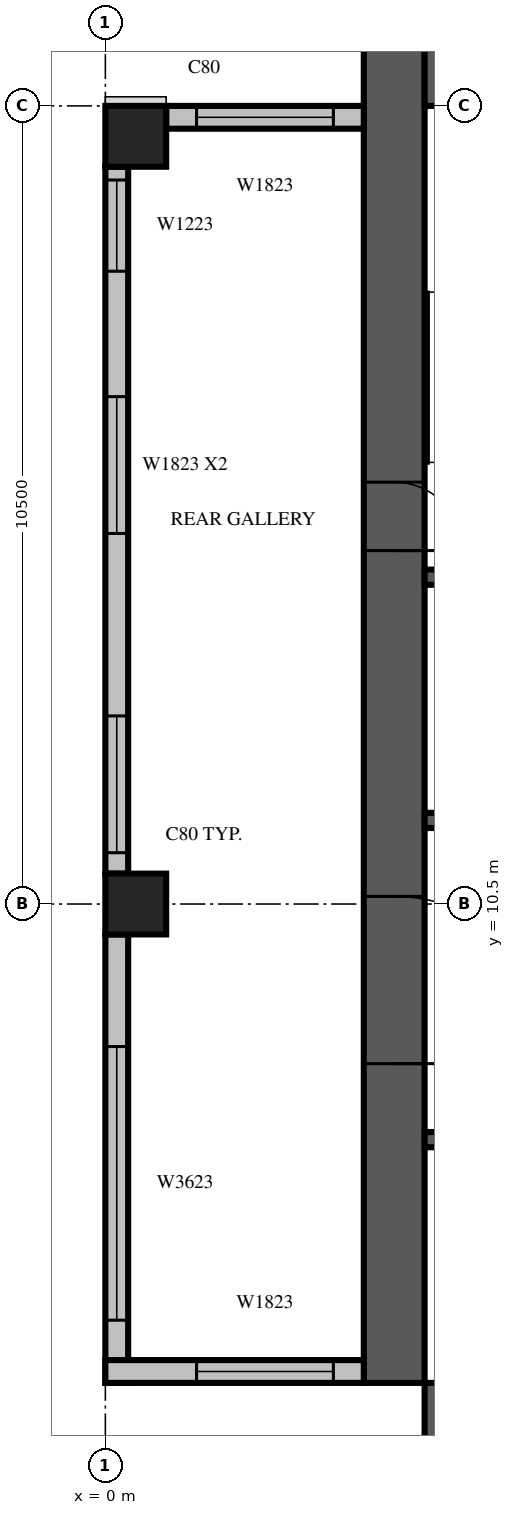
"""IFC4 building model, lengths in metres.
Left out: names, types, materials, properties, quantities, classifications, styles, units other than length and angle.
Written with IfcOpenShell. Run it as: python <this file> out.ifc"""

import sys

from ifc_helpers import new_model, si_unit, direction, frame, frame_2d, origin, origin_2d, place, context, subcontext, project, spatial, rectangle, extrude, source, transform, mapped, element, fill, save


model = new_model("IFC4")
c1 = context("Model", 3, precision=1e-05, world=origin(), true_north=direction((0.0, 1.0)))
c2 = subcontext(c1, "Body", "Model", "MODEL_VIEW")
j1 = project(units=[si_unit("LENGTHUNIT", "METRE"), si_unit("PLANEANGLEUNIT", "RADIAN")], contexts=[c1])
p1 = place(None, origin())
s1 = spatial("IfcSite", under=j1, at=p1, CompositionType="ELEMENT")
p2 = place(p1, origin())
s2 = spatial("IfcBuilding", under=s1, at=p2, CompositionType="ELEMENT")
p3 = place(p2, frame((0.0, 0.0, 250.0)))
s3 = spatial("IfcBuildingStorey", under=s2, at=p3, CompositionType="ELEMENT", Elevation=250.0)
m1 = source(origin(), c2, "Body", "SweptSolid", [
    extrude(rectangle(XDim=0.8, YDim=0.8, at=origin_2d()), origin(), (0.0, 0.0, 1.0), 3.8),
])
for number, where, z_axis, x_axis in (
    (1, (0.4, 10.5, 0.0), (0.0, 0.0, 1.0), (1.0, 0.0, 0.0)),
    (2, (0.4, 20.6, 0.0), (0.0, 0.0, 1.0), (1.0, 0.0, 0.0)),
):
    element("IfcColumn", number, at=place(p3, frame(where, z_axis=z_axis, x_axis=x_axis)), inside=s3, PredefinedType="COLUMN", context=c2, shape_type="MappedRepresentation", body=[
        mapped(m1, transform((0.0, 0.0, 0.0), scale=1.0)),
    ])
m2 = source(origin(), c2, "Body", "SweptSolid", [
    extrude(rectangle(XDim=17.6, YDim=0.8, at=frame_2d((8.8, 0.0))), origin(), (0.0, 0.0, 1.0), 3.8),
])
p4 = place(p3, frame((3.8, 4.2, 0.0), z_axis=(0.0, 0.0, 1.0), x_axis=(0.0, 1.0, 0.0)))
e3 = element("IfcWall", 3, at=p4, inside=s3, PredefinedType="SHEAR", context=c2, shape_type="MappedRepresentation", body=[
    mapped(m2, transform((0.0, 0.0, 0.0), scale=1.0)),
])
m3 = source(origin(), c2, "Body", "SweptSolid", [
    extrude(rectangle(XDim=2.2, YDim=2.1, at=frame_2d((1.1, 1.05))), frame((0.0, 0.41, 0.0), z_axis=(0.0, -1.0, 0.0), x_axis=(1.0, 0.0, 0.0)), (0.0, 0.0, 1.0), 0.82),
])
p5 = place(p4, frame((4.2, 0.0, 0.0)))
e4 = element("IfcOpeningElement", 4, at=p5, cuts=e3, PredefinedType="OPENING", context=c2, shape_type="MappedRepresentation", body=[
    mapped(m3, transform((0.0, 0.0, 0.0), scale=1.0)),
])
m4 = source(origin(), c2, "Body", "SweptSolid", [
    extrude(rectangle(XDim=0.9, YDim=2.1, at=frame_2d((0.45, 1.05))), frame((0.0, 0.41, 0.0), z_axis=(0.0, -1.0, 0.0), x_axis=(1.0, 0.0, 0.0)), (0.0, 0.0, 1.0), 0.82),
])
p6 = place(p4, frame((10.95, 0.0, 0.0)))
e5 = element("IfcOpeningElement", 5, at=p6, cuts=e3, PredefinedType="OPENING", context=c2, shape_type="MappedRepresentation", body=[
    mapped(m4, transform((0.0, 0.0, 0.0), scale=1.0)),
])
p7 = place(p3, frame((4.2, 3.8, 0.0), z_axis=(0.0, 0.0, 1.0), x_axis=(1.0, 0.0, 0.0)))
e6 = element("IfcWall", 6, at=p7, inside=s3, PredefinedType="SHEAR", context=c2, shape_type="MappedRepresentation", body=[
    mapped(m2, transform((0.0, 0.0, 0.0), scale=1.0)),
])
p8 = place(p7, frame((11.55, 0.0, 0.0)))
e7 = element("IfcOpeningElement", 7, at=p8, cuts=e6, PredefinedType="OPENING", context=c2, shape_type="MappedRepresentation", body=[
    mapped(m4, transform((0.0, 0.0, 0.0), scale=1.0)),
])
m5 = source(origin(), c2, "Body", "SweptSolid", [
    extrude(rectangle(XDim=16.8, YDim=0.8, at=frame_2d((8.4, 0.0))), origin(), (0.0, 0.0, 1.0), 3.8),
])
p9 = place(p3, frame((4.2, 21.4, 0.0), z_axis=(0.0, 0.0, 1.0), x_axis=(1.0, 0.0, 0.0)))
e8 = element("IfcWall", 8, at=p9, inside=s3, PredefinedType="SHEAR", context=c2, shape_type="MappedRepresentation", body=[
    mapped(m5, transform((0.0, 0.0, 0.0), scale=1.0)),
])
m6 = source(origin(), c2, "Body", "SweptSolid", [
    extrude(rectangle(XDim=1.2, YDim=2.1, at=frame_2d((0.6, 1.05))), frame((0.0, 0.41, 0.0), z_axis=(0.0, -1.0, 0.0), x_axis=(1.0, 0.0, 0.0)), (0.0, 0.0, 1.0), 0.82),
])
p10 = place(p9, frame((6.2, 0.0, 0.0)))
e9 = element("IfcOpeningElement", 9, at=p10, cuts=e8, PredefinedType="OPENING", context=c2, shape_type="MappedRepresentation", body=[
    mapped(m6, transform((0.0, 0.0, 0.0), scale=1.0)),
])
m7 = source(origin(), c2, "Body", "SweptSolid", [
    extrude(rectangle(XDim=2.6, YDim=0.3, at=frame_2d((1.3, 0.0))), origin(), (0.0, 0.0, 1.0), 3.4),
])
p11 = place(p3, frame((3.4, 20.85, 0.0), z_axis=(0.0, 0.0, 1.0), x_axis=(-1.0, 0.0, 0.0)))
e10 = element("IfcWall", 10, at=p11, inside=s3, PredefinedType="STANDARD", context=c2, shape_type="MappedRepresentation", body=[
    mapped(m7, transform((0.0, 0.0, 0.0), scale=1.0)),
])
m8 = source(origin(), c2, "Body", "SweptSolid", [
    extrude(rectangle(XDim=1.8, YDim=2.3, at=frame_2d((0.9, 1.15))), frame((0.0, 0.16, 0.0), z_axis=(0.0, -1.0, 0.0), x_axis=(1.0, 0.0, 0.0)), (0.0, 0.0, 1.0), 0.32),
])
p12 = place(p11, frame((0.4, 0.0, 0.6)))
e11 = element("IfcOpeningElement", 11, at=p12, cuts=e10, PredefinedType="OPENING", context=c2, shape_type="MappedRepresentation", body=[
    mapped(m8, transform((0.0, 0.0, 0.0), scale=1.0)),
])
m9 = source(origin(), c2, "Body", "SweptSolid", [
    extrude(rectangle(XDim=9.3, YDim=0.3, at=frame_2d((4.65, 0.0))), origin(), (0.0, 0.0, 1.0), 3.4),
])
p13 = place(p3, frame((0.15, 20.2, 0.0), z_axis=(0.0, 0.0, 1.0), x_axis=(0.0, -1.0, 0.0)))
e12 = element("IfcWall", 12, at=p13, inside=s3, PredefinedType="STANDARD", context=c2, shape_type="MappedRepresentation", body=[
    mapped(m9, transform((0.0, 0.0, 0.0), scale=1.0)),
])
m10 = source(origin(), c2, "Body", "SweptSolid", [
    extrude(rectangle(XDim=1.2, YDim=2.3, at=frame_2d((0.6, 1.15))), frame((0.0, 0.16, 0.0), z_axis=(0.0, -1.0, 0.0), x_axis=(1.0, 0.0, 0.0)), (0.0, 0.0, 1.0), 0.32),
])
p14 = place(p13, frame((0.175, 0.0, 0.6)))
e13 = element("IfcOpeningElement", 13, at=p14, cuts=e12, PredefinedType="OPENING", context=c2, shape_type="MappedRepresentation", body=[
    mapped(m10, transform((0.0, 0.0, 0.0), scale=1.0)),
])
p15 = place(p13, frame((3.025, 0.0, 0.6)))
e14 = element("IfcOpeningElement", 14, at=p15, cuts=e12, PredefinedType="OPENING", context=c2, shape_type="MappedRepresentation", body=[
    mapped(m8, transform((0.0, 0.0, 0.0), scale=1.0)),
])
p16 = place(p13, frame((7.225, 0.0, 0.6)))
e15 = element("IfcOpeningElement", 15, at=p16, cuts=e12, PredefinedType="OPENING", context=c2, shape_type="MappedRepresentation", body=[
    mapped(m8, transform((0.0, 0.0, 0.0), scale=1.0)),
])
m11 = source(origin(), c2, "Body", "SweptSolid", [
    extrude(rectangle(XDim=5.9, YDim=0.3, at=frame_2d((2.95, 0.0))), origin(), (0.0, 0.0, 1.0), 3.4),
])
p17 = place(p3, frame((0.15, 10.1, 0.0), z_axis=(0.0, 0.0, 1.0), x_axis=(0.0, -1.0, 0.0)))
e16 = element("IfcWall", 16, at=p17, inside=s3, PredefinedType="STANDARD", context=c2, shape_type="MappedRepresentation", body=[
    mapped(m11, transform((0.0, 0.0, 0.0), scale=1.0)),
])
m12 = source(origin(), c2, "Body", "SweptSolid", [
    extrude(rectangle(XDim=3.6, YDim=2.3, at=frame_2d((1.8, 1.15))), frame((0.0, 0.16, 0.0), z_axis=(0.0, -1.0, 0.0), x_axis=(1.0, 0.0, 0.0)), (0.0, 0.0, 1.0), 0.32),
])
p18 = place(p17, frame((1.475, 0.0, 0.6)))
e17 = element("IfcOpeningElement", 17, at=p18, cuts=e16, PredefinedType="OPENING", context=c2, shape_type="MappedRepresentation", body=[
    mapped(m12, transform((0.0, 0.0, 0.0), scale=1.0)),
])
m13 = source(origin(), c2, "Body", "SweptSolid", [
    extrude(rectangle(XDim=3.4, YDim=0.3, at=frame_2d((1.7, 0.0))), origin(), (0.0, 0.0, 1.0), 3.4),
])
p19 = place(p3, frame((0.0, 4.35, 0.0), z_axis=(0.0, 0.0, 1.0), x_axis=(1.0, 0.0, 0.0)))
e18 = element("IfcWall", 18, at=p19, inside=s3, PredefinedType="STANDARD", context=c2, shape_type="MappedRepresentation", body=[
    mapped(m13, transform((0.0, 0.0, 0.0), scale=1.0)),
])
p20 = place(p19, frame((1.2, 0.0, 0.6)))
e19 = element("IfcOpeningElement", 19, at=p20, cuts=e18, PredefinedType="OPENING", context=c2, shape_type="MappedRepresentation", body=[
    mapped(m8, transform((0.0, 0.0, 0.0), scale=1.0)),
])
m14 = source(origin(), c2, "Body", "SweptSolid", [
    extrude(rectangle(XDim=9.6, YDim=0.2, at=frame_2d((4.8, 0.0))), origin(), (0.0, 0.0, 1.0), 3.8),
])
p21 = place(p3, frame((4.2, 7.4, 0.0), z_axis=(0.0, 0.0, 1.0), x_axis=(1.0, 0.0, 0.0)))
e20 = element("IfcWall", 20, at=p21, inside=s3, PredefinedType="SOLIDWALL", context=c2, shape_type="MappedRepresentation", body=[
    mapped(m14, transform((0.0, 0.0, 0.0), scale=1.0)),
])
m15 = source(origin(), c2, "Body", "SweptSolid", [
    extrude(rectangle(XDim=1.1, YDim=2.1, at=frame_2d((0.55, 1.05))), frame((0.0, 0.11, 0.0), z_axis=(0.0, -1.0, 0.0), x_axis=(1.0, 0.0, 0.0)), (0.0, 0.0, 1.0), 0.22),
])
p22 = place(p21, frame((0.65, 0.0, 0.0)))
e21 = element("IfcOpeningElement", 21, at=p22, cuts=e20, PredefinedType="OPENING", context=c2, shape_type="MappedRepresentation", body=[
    mapped(m15, transform((0.0, 0.0, 0.0), scale=1.0)),
])
p23 = place(p21, frame((3.05, 0.0, 0.0)))
e22 = element("IfcOpeningElement", 22, at=p23, cuts=e20, PredefinedType="OPENING", context=c2, shape_type="MappedRepresentation", body=[
    mapped(m15, transform((0.0, 0.0, 0.0), scale=1.0)),
])
p24 = place(p21, frame((5.45, 0.0, 0.0)))
e23 = element("IfcOpeningElement", 23, at=p24, cuts=e20, PredefinedType="OPENING", context=c2, shape_type="MappedRepresentation", body=[
    mapped(m15, transform((0.0, 0.0, 0.0), scale=1.0)),
])
p25 = place(p21, frame((7.85, 0.0, 0.0)))
e24 = element("IfcOpeningElement", 24, at=p25, cuts=e20, PredefinedType="OPENING", context=c2, shape_type="MappedRepresentation", body=[
    mapped(m15, transform((0.0, 0.0, 0.0), scale=1.0)),
])
m16 = source(origin(), c2, "Body", "SweptSolid", [
    extrude(rectangle(XDim=4.8, YDim=0.2, at=frame_2d((2.4, 0.0))), origin(), (0.0, 0.0, 1.0), 3.8),
])
p26 = place(p3, frame((4.2, 11.6, 0.0), z_axis=(0.0, 0.0, 1.0), x_axis=(1.0, 0.0, 0.0)))
e25 = element("IfcWall", 25, at=p26, inside=s3, PredefinedType="SOLIDWALL", context=c2, shape_type="MappedRepresentation", body=[
    mapped(m16, transform((0.0, 0.0, 0.0), scale=1.0)),
])
p27 = place(p26, frame((0.65, 0.0, 0.0)))
e26 = element("IfcOpeningElement", 26, at=p27, cuts=e25, PredefinedType="OPENING", context=c2, shape_type="MappedRepresentation", body=[
    mapped(m15, transform((0.0, 0.0, 0.0), scale=1.0)),
])
p28 = place(p26, frame((3.05, 0.0, 0.0)))
e27 = element("IfcOpeningElement", 27, at=p28, cuts=e25, PredefinedType="OPENING", context=c2, shape_type="MappedRepresentation", body=[
    mapped(m15, transform((0.0, 0.0, 0.0), scale=1.0)),
])
p29 = place(p3, frame((4.2, 14.8, 0.0), z_axis=(0.0, 0.0, 1.0), x_axis=(1.0, 0.0, 0.0)))
e28 = element("IfcWall", 28, at=p29, inside=s3, PredefinedType="SOLIDWALL", context=c2, shape_type="MappedRepresentation", body=[
    mapped(m16, transform((0.0, 0.0, 0.0), scale=1.0)),
])
m17 = source(origin(), c2, "Body", "SweptSolid", [
    extrude(rectangle(XDim=1.8, YDim=2.3, at=frame_2d((0.9, 1.15))), frame((0.0, 0.03, 0.0), z_axis=(0.0, -1.0, 0.0), x_axis=(1.0, 0.0, 0.0)), (0.0, 0.0, 1.0), 0.06),
])
p30 = place(p12, origin())
e29 = element("IfcWindow", 29, at=p30, inside=s3, PartitioningType="SINGLE_PANEL", PredefinedType="WINDOW", context=c2, shape_type="MappedRepresentation", body=[
    mapped(m17, transform((0.0, 0.0, 0.0), scale=1.0)),
])
fill(e11, e29)
m18 = source(origin(), c2, "Body", "SweptSolid", [
    extrude(rectangle(XDim=1.2, YDim=2.3, at=frame_2d((0.6, 1.15))), frame((0.0, 0.03, 0.0), z_axis=(0.0, -1.0, 0.0), x_axis=(1.0, 0.0, 0.0)), (0.0, 0.0, 1.0), 0.06),
])
p31 = place(p14, origin())
e30 = element("IfcWindow", 30, at=p31, inside=s3, PartitioningType="SINGLE_PANEL", PredefinedType="WINDOW", context=c2, shape_type="MappedRepresentation", body=[
    mapped(m18, transform((0.0, 0.0, 0.0), scale=1.0)),
])
fill(e13, e30)
p32 = place(p15, origin())
e31 = element("IfcWindow", 31, at=p32, inside=s3, PartitioningType="SINGLE_PANEL", PredefinedType="WINDOW", context=c2, shape_type="MappedRepresentation", body=[
    mapped(m17, transform((0.0, 0.0, 0.0), scale=1.0)),
])
fill(e14, e31)
p33 = place(p16, origin())
e32 = element("IfcWindow", 32, at=p33, inside=s3, PartitioningType="SINGLE_PANEL", PredefinedType="WINDOW", context=c2, shape_type="MappedRepresentation", body=[
    mapped(m17, transform((0.0, 0.0, 0.0), scale=1.0)),
])
fill(e15, e32)
m19 = source(origin(), c2, "Body", "SweptSolid", [
    extrude(rectangle(XDim=3.6, YDim=2.3, at=frame_2d((1.8, 1.15))), frame((0.0, 0.03, 0.0), z_axis=(0.0, -1.0, 0.0), x_axis=(1.0, 0.0, 0.0)), (0.0, 0.0, 1.0), 0.06),
])
p34 = place(p18, origin())
e33 = element("IfcWindow", 33, at=p34, inside=s3, PartitioningType="SINGLE_PANEL", PredefinedType="WINDOW", context=c2, shape_type="MappedRepresentation", body=[
    mapped(m19, transform((0.0, 0.0, 0.0), scale=1.0)),
])
fill(e17, e33)
p35 = place(p20, origin())
e34 = element("IfcWindow", 34, at=p35, inside=s3, PartitioningType="SINGLE_PANEL", PredefinedType="WINDOW", context=c2, shape_type="MappedRepresentation", body=[
    mapped(m17, transform((0.0, 0.0, 0.0), scale=1.0)),
])
fill(e19, e34)
m20 = source(origin(), c2, "Body", "SweptSolid", [
    extrude(rectangle(XDim=2.2, YDim=2.1, at=frame_2d((1.1, 1.05))), frame((0.0, 0.025, 0.0), z_axis=(0.0, -1.0, 0.0), x_axis=(1.0, 0.0, 0.0)), (0.0, 0.0, 1.0), 0.05),
])
p36 = place(p5, origin())
e35 = element("IfcDoor", 35, at=p36, inside=s3, OperationType="DOUBLE_DOOR_SINGLE_SWING", PredefinedType="DOOR", context=c2, shape_type="MappedRepresentation", body=[
    mapped(m20, transform((0.0, 0.0, 0.0), scale=1.0)),
])
fill(e4, e35)
m21 = source(origin(), c2, "Body", "SweptSolid", [
    extrude(rectangle(XDim=0.9, YDim=2.1, at=frame_2d((0.45, 1.05))), frame((0.0, 0.025, 0.0), z_axis=(0.0, -1.0, 0.0), x_axis=(1.0, 0.0, 0.0)), (0.0, 0.0, 1.0), 0.05),
])
p37 = place(p6, origin())
e36 = element("IfcDoor", 36, at=p37, inside=s3, OperationType="SINGLE_SWING_RIGHT", PredefinedType="DOOR", context=c2, shape_type="MappedRepresentation", body=[
    mapped(m21, transform((0.0, 0.0, 0.0), scale=1.0)),
])
fill(e5, e36)
save(model, sys.argv[1])
